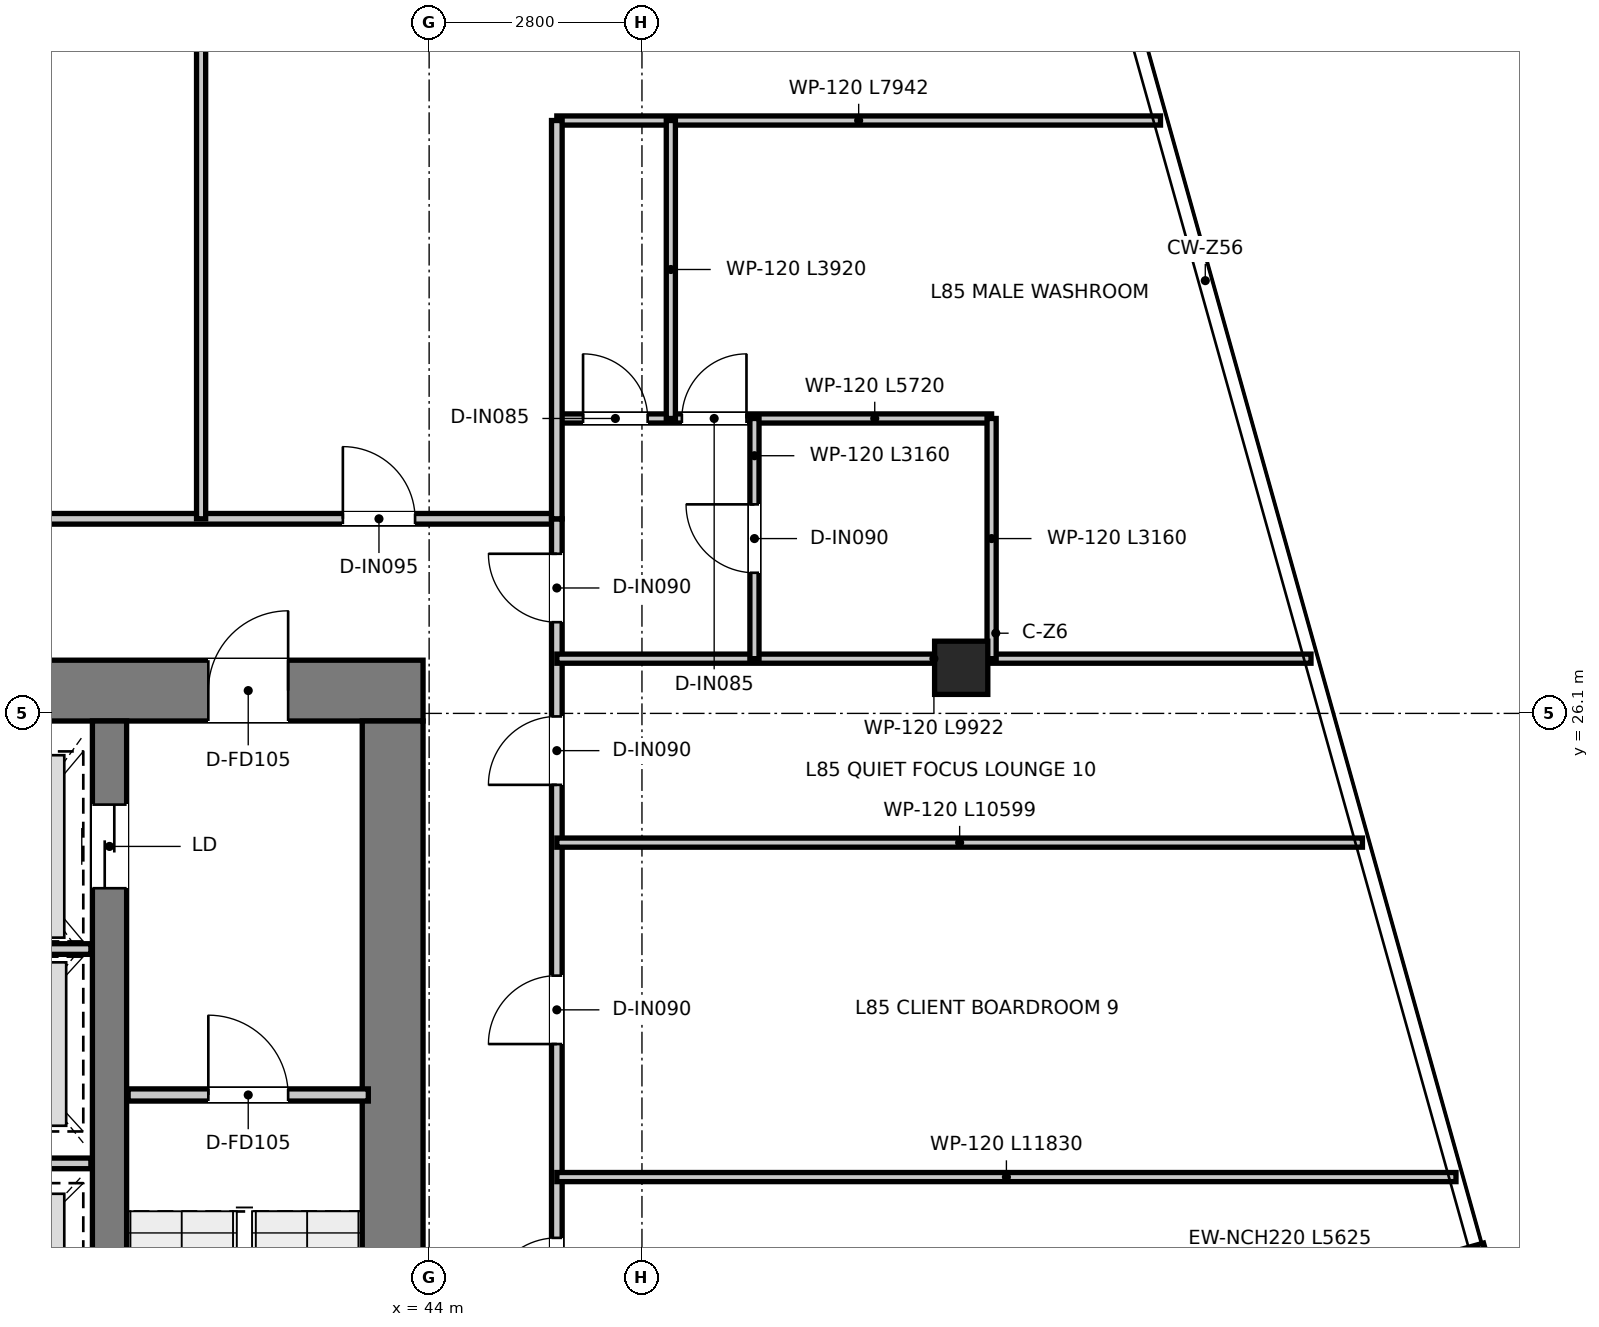
"""IFC4 building model, lengths in metres.
Left out: names, types, materials, properties, quantities, classifications, styles, units other than length and angle.
Written with IfcOpenShell. Run it as: python <this file> out.ifc"""

import sys

from ifc_helpers import new_model, si_unit, direction, frame, frame_2d, origin, origin_2d, place, context, subcontext, project, spatial, rectangle, extrude, source, transform, mapped, element, fill, save


model = new_model("IFC4")
c1 = context("Model", 3, precision=1e-05, world=origin(), true_north=direction((0.0, 1.0)))
c2 = subcontext(c1, "Body", "Model", "MODEL_VIEW")
j1 = project(units=[si_unit("LENGTHUNIT", "METRE"), si_unit("PLANEANGLEUNIT", "RADIAN")], contexts=[c1])
p1 = place(None, origin())
s1 = spatial("IfcSite", under=j1, at=p1, CompositionType="ELEMENT")
p2 = place(p1, origin())
s2 = spatial("IfcBuilding", under=s1, at=p2, CompositionType="ELEMENT")
p3 = place(p2, frame((0.0, 0.0, 347.45)))
s3 = spatial("IfcBuildingStorey", under=s2, at=p3, CompositionType="ELEMENT", Elevation=347.45)
p4 = place(p3, frame((28.08, 26.4, 0.0), z_axis=(0.0, 0.0, 1.0), x_axis=(1.0, 0.0, 0.0)))
e1 = element("IfcWall", 1, at=p4, inside=s3, PredefinedType="SHEAR", context=c2, shape_type="SweptSolid", body=[
    extrude(rectangle(XDim=15.84, YDim=0.8, at=frame_2d((7.92, 0.0))), origin(), (0.0, 0.0, 1.0), 3.95),
])
p5 = place(p4, frame((7.22, 0.0, 0.0)))
e2 = element("IfcOpeningElement", 2, at=p5, cuts=e1, PredefinedType="OPENING", context=c2, shape_type="SweptSolid", body=[
    extrude(rectangle(XDim=1.4, YDim=2.2, at=frame_2d((0.7, 1.1))), frame((0.0, 0.41, 0.0), z_axis=(0.0, -1.0, 0.0), x_axis=(1.0, 0.0, 0.0)), (0.0, 0.0, 1.0), 0.82),
])
p6 = place(p4, frame((1.775, 0.0, 0.0)))
e3 = element("IfcOpeningElement", 3, at=p6, cuts=e1, PredefinedType="OPENING", context=c2, shape_type="SweptSolid", body=[
    extrude(rectangle(XDim=1.05, YDim=2.1, at=frame_2d((0.525, 1.05))), frame((0.0, 0.41, 0.0), z_axis=(0.0, -1.0, 0.0), x_axis=(1.0, 0.0, 0.0)), (0.0, 0.0, 1.0), 0.82),
])
p7 = place(p4, frame((13.015, 0.0, 0.0)))
e4 = element("IfcOpeningElement", 4, at=p7, cuts=e1, PredefinedType="OPENING", context=c2, shape_type="SweptSolid", body=[
    extrude(rectangle(XDim=1.05, YDim=2.1, at=frame_2d((0.525, 1.05))), frame((0.0, 0.41, 0.0), z_axis=(0.0, -1.0, 0.0), x_axis=(1.0, 0.0, 0.0)), (0.0, 0.0, 1.0), 0.82),
])
p8 = place(p3, frame((43.52, 11.3, 0.0), z_axis=(0.0, 0.0, 1.0), x_axis=(0.0, 1.0, 0.0)))
e5 = element("IfcWall", 5, at=p8, inside=s3, PredefinedType="SHEAR", context=c2, shape_type="SweptSolid", body=[
    extrude(rectangle(XDim=14.7, YDim=0.8, at=frame_2d((7.35, 0.0))), origin(), (0.0, 0.0, 1.0), 3.95),
])
p9 = place(p3, frame((39.795, 13.22, 0.0), z_axis=(0.0, 0.0, 1.0), x_axis=(0.0, 1.0, 0.0)))
e6 = element("IfcWall", 6, at=p9, inside=s3, PredefinedType="SHEAR", context=c2, shape_type="SweptSolid", body=[
    extrude(rectangle(XDim=12.78, YDim=0.45, at=frame_2d((6.39, 0.0))), origin(), (0.0, 0.0, 1.0), 3.95),
])
p10 = place(p9, frame((10.58, 0.0, 0.0)))
e7 = element("IfcOpeningElement", 7, at=p10, cuts=e6, PredefinedType="OPENING", context=c2, shape_type="SweptSolid", body=[
    extrude(rectangle(XDim=1.1, YDim=2.15, at=frame_2d((0.55, 1.075))), frame((0.0, 0.235, 0.0), z_axis=(0.0, -1.0, 0.0), x_axis=(1.0, 0.0, 0.0)), (0.0, 0.0, 1.0), 0.47),
])
m1 = source(origin(), c2, "Body", "SweptSolid", [
    extrude(rectangle(XDim=0.7, YDim=0.7, at=origin_2d()), origin(), (0.0, 0.0, 1.0), 3.95),
])
p11 = place(p3, frame((51.0, 26.7, 0.0), z_axis=(0.0, 0.0, 1.0), x_axis=(1.0, 0.0, 0.0)))
e8 = element("IfcColumn", 8, at=p11, inside=s3, PredefinedType="COLUMN", context=c2, shape_type="MappedRepresentation", body=[
    mapped(m1, transform((0.0, 0.0, 0.0), x_axis=(1.0, 0.0, 0.0), y_axis=(0.0, 1.0, 0.0), z_axis=(0.0, 0.0, 1.0), scale=1.0)),
])
p12 = place(p3, frame((52.484, 17.51, 0.0), z_axis=(0.0, 0.0, 1.0), x_axis=(0.963038811961, 0.269362667524, 0.0)))
e9 = element("IfcWall", 9, at=p12, inside=s3, PredefinedType="ELEMENTEDWALL", context=c2, shape_type="SweptSolid", body=[
    extrude(rectangle(XDim=5.625, YDim=0.22, at=frame_2d((2.812, 0.0))), origin(), (0.0, 0.0, 1.0), 3.67),
])
p13 = place(p3, frame((40.04, 21.08, 0.0), z_axis=(0.0, 0.0, 1.0), x_axis=(1.0, 0.0, 0.0)))
e10 = element("IfcWall", 10, at=p13, inside=s3, PredefinedType="PARTITIONING", context=c2, shape_type="SweptSolid", body=[
    extrude(rectangle(XDim=3.16, YDim=0.16, at=frame_2d((1.58, 0.0))), origin(), (0.0, 0.0, 1.0), 3.67),
])
p14 = place(p13, frame((1.055, 0.0, 0.0)))
e11 = element("IfcOpeningElement", 11, at=p14, cuts=e10, PredefinedType="OPENING", context=c2, shape_type="SweptSolid", body=[
    extrude(rectangle(XDim=1.05, YDim=2.1, at=frame_2d((0.525, 1.05))), frame((0.0, 0.09, 0.0), z_axis=(0.0, -1.0, 0.0), x_axis=(1.0, 0.0, 0.0)), (0.0, 0.0, 1.0), 0.18),
])
p15 = place(p3, frame((37.28, 23.0, 0.0), z_axis=(0.0, 0.0, 1.0), x_axis=(1.0, 0.0, 0.0)))
e12 = element("IfcWall", 12, at=p15, inside=s3, PredefinedType="PARTITIONING", context=c2, shape_type="SweptSolid", body=[
    extrude(rectangle(XDim=2.27, YDim=0.14, at=frame_2d((1.135, 0.0))), origin(), (0.0, 0.0, 1.0), 2.82),
])
p16 = place(p3, frame((37.28, 20.18, 0.0), z_axis=(0.0, 0.0, 1.0), x_axis=(1.0, 0.0, 0.0)))
e13 = element("IfcWall", 13, at=p16, inside=s3, PredefinedType="PARTITIONING", context=c2, shape_type="SweptSolid", body=[
    extrude(rectangle(XDim=2.27, YDim=0.14, at=frame_2d((1.135, 0.0))), origin(), (0.0, 0.0, 1.0), 3.67),
])
p17 = place(p3, frame((26.32, 28.66, 0.0), z_axis=(0.0, 0.0, 1.0), x_axis=(1.0, 0.0, 0.0)))
e14 = element("IfcWall", 14, at=p17, inside=s3, PredefinedType="PARTITIONING", context=c2, shape_type="SweptSolid", body=[
    extrude(rectangle(XDim=19.36, YDim=0.14, at=frame_2d((9.68, 0.0))), origin(), (0.0, 0.0, 1.0), 3.18),
])
p18 = place(p17, frame((1.115, 0.0, 0.0)))
e15 = element("IfcOpeningElement", 15, at=p18, cuts=e14, PredefinedType="OPENING", context=c2, shape_type="SweptSolid", body=[
    extrude(rectangle(XDim=0.95, YDim=2.1, at=frame_2d((0.475, 1.05))), frame((0.0, 0.08, 0.0), z_axis=(0.0, -1.0, 0.0), x_axis=(1.0, 0.0, 0.0)), (0.0, 0.0, 1.0), 0.16),
])
p19 = place(p17, frame((5.455, 0.0, 0.0)))
e16 = element("IfcOpeningElement", 16, at=p19, cuts=e14, PredefinedType="OPENING", context=c2, shape_type="SweptSolid", body=[
    extrude(rectangle(XDim=0.95, YDim=2.1, at=frame_2d((0.475, 1.05))), frame((0.0, 0.08, 0.0), z_axis=(0.0, -1.0, 0.0), x_axis=(1.0, 0.0, 0.0)), (0.0, 0.0, 1.0), 0.16),
])
p20 = place(p17, frame((11.205, 0.0, 0.0)))
e17 = element("IfcOpeningElement", 17, at=p20, cuts=e14, PredefinedType="OPENING", context=c2, shape_type="SweptSolid", body=[
    extrude(rectangle(XDim=0.95, YDim=2.1, at=frame_2d((0.475, 1.05))), frame((0.0, 0.08, 0.0), z_axis=(0.0, -1.0, 0.0), x_axis=(1.0, 0.0, 0.0)), (0.0, 0.0, 1.0), 0.16),
])
p21 = place(p17, frame((16.545, 0.0, 0.0)))
e18 = element("IfcOpeningElement", 18, at=p21, cuts=e14, PredefinedType="OPENING", context=c2, shape_type="SweptSolid", body=[
    extrude(rectangle(XDim=0.95, YDim=2.1, at=frame_2d((0.475, 1.05))), frame((0.0, 0.08, 0.0), z_axis=(0.0, -1.0, 0.0), x_axis=(1.0, 0.0, 0.0)), (0.0, 0.0, 1.0), 0.16),
])
p22 = place(p3, frame((45.68, 13.0, 0.0), z_axis=(0.0, 0.0, 1.0), x_axis=(0.0, 1.0, 0.0)))
e19 = element("IfcWall", 19, at=p22, inside=s3, PredefinedType="PARTITIONING", context=c2, shape_type="SweptSolid", body=[
    extrude(rectangle(XDim=15.66, YDim=0.14, at=frame_2d((7.83, 0.0))), origin(), (0.0, 0.0, 1.0), 3.13),
])
p23 = place(p22, frame((14.3, 0.0, 0.0)))
e20 = element("IfcOpeningElement", 20, at=p23, cuts=e19, PredefinedType="OPENING", context=c2, shape_type="SweptSolid", body=[
    extrude(rectangle(XDim=0.9, YDim=2.1, at=frame_2d((0.45, 1.05))), frame((0.0, 0.08, 0.0), z_axis=(0.0, -1.0, 0.0), x_axis=(1.0, 0.0, 0.0)), (0.0, 0.0, 1.0), 0.16),
])
p24 = place(p22, frame((5.3, 0.0, 0.0)))
e21 = element("IfcOpeningElement", 21, at=p24, cuts=e19, PredefinedType="OPENING", context=c2, shape_type="SweptSolid", body=[
    extrude(rectangle(XDim=0.9, YDim=2.1, at=frame_2d((0.45, 1.05))), frame((0.0, 0.08, 0.0), z_axis=(0.0, -1.0, 0.0), x_axis=(1.0, 0.0, 0.0)), (0.0, 0.0, 1.0), 0.16),
])
p25 = place(p22, frame((8.75, 0.0, 0.0)))
e22 = element("IfcOpeningElement", 22, at=p25, cuts=e19, PredefinedType="OPENING", context=c2, shape_type="SweptSolid", body=[
    extrude(rectangle(XDim=0.9, YDim=2.1, at=frame_2d((0.45, 1.05))), frame((0.0, 0.08, 0.0), z_axis=(0.0, -1.0, 0.0), x_axis=(1.0, 0.0, 0.0)), (0.0, 0.0, 1.0), 0.16),
])
p26 = place(p22, frame((12.16, 0.0, 0.0)))
e23 = element("IfcOpeningElement", 23, at=p26, cuts=e19, PredefinedType="OPENING", context=c2, shape_type="SweptSolid", body=[
    extrude(rectangle(XDim=0.9, YDim=2.1, at=frame_2d((0.45, 1.05))), frame((0.0, 0.08, 0.0), z_axis=(0.0, -1.0, 0.0), x_axis=(1.0, 0.0, 0.0)), (0.0, 0.0, 1.0), 0.16),
])
p27 = place(p3, frame((45.68, 26.82, 0.0), z_axis=(0.0, 0.0, 1.0), x_axis=(1.0, 0.0, 0.0)))
e24 = element("IfcWall", 24, at=p27, inside=s3, PredefinedType="PARTITIONING", context=c2, shape_type="SweptSolid", body=[
    extrude(rectangle(XDim=9.922, YDim=0.12, at=frame_2d((4.961, 0.0))), origin(), (0.0, 0.0, 1.0), 3.13),
])
p28 = place(p3, frame((45.68, 33.9, 0.0), z_axis=(0.0, 0.0, 1.0), x_axis=(1.0, 0.0, 0.0)))
e25 = element("IfcWall", 25, at=p28, inside=s3, PredefinedType="PARTITIONING", context=c2, shape_type="SweptSolid", body=[
    extrude(rectangle(XDim=7.942, YDim=0.12, at=frame_2d((3.971, 0.0))), origin(), (0.0, 0.0, 1.0), 3.13),
])
p29 = place(p3, frame((45.68, 29.98, 0.0), z_axis=(0.0, 0.0, 1.0), x_axis=(1.0, 0.0, 0.0)))
e26 = element("IfcWall", 26, at=p29, inside=s3, PredefinedType="PARTITIONING", context=c2, shape_type="SweptSolid", body=[
    extrude(rectangle(XDim=5.72, YDim=0.12, at=frame_2d((2.86, 0.0))), origin(), (0.0, 0.0, 1.0), 3.13),
])
p30 = place(p29, frame((1.645, 0.0, 0.0)))
e27 = element("IfcOpeningElement", 27, at=p30, cuts=e26, PredefinedType="OPENING", context=c2, shape_type="SweptSolid", body=[
    extrude(rectangle(XDim=0.85, YDim=2.1, at=frame_2d((0.425, 1.05))), frame((0.0, 0.07, 0.0), z_axis=(0.0, -1.0, 0.0), x_axis=(1.0, 0.0, 0.0)), (0.0, 0.0, 1.0), 0.14),
])
p31 = place(p29, frame((0.345, 0.0, 0.0)))
e28 = element("IfcOpeningElement", 28, at=p31, cuts=e26, PredefinedType="OPENING", context=c2, shape_type="SweptSolid", body=[
    extrude(rectangle(XDim=0.85, YDim=2.1, at=frame_2d((0.425, 1.05))), frame((0.0, 0.07, 0.0), z_axis=(0.0, -1.0, 0.0), x_axis=(1.0, 0.0, 0.0)), (0.0, 0.0, 1.0), 0.14),
])
p32 = place(p3, frame((51.4, 26.82, 0.0), z_axis=(0.0, 0.0, 1.0), x_axis=(0.0, 1.0, 0.0)))
e29 = element("IfcWall", 29, at=p32, inside=s3, PredefinedType="PARTITIONING", context=c2, shape_type="SweptSolid", body=[
    extrude(rectangle(XDim=3.16, YDim=0.12, at=frame_2d((1.58, 0.0))), origin(), (0.0, 0.0, 1.0), 3.67),
])
p33 = place(p3, frame((48.28, 26.82, 0.0), z_axis=(0.0, 0.0, 1.0), x_axis=(0.0, 1.0, 0.0)))
e30 = element("IfcWall", 30, at=p33, inside=s3, PredefinedType="PARTITIONING", context=c2, shape_type="SweptSolid", body=[
    extrude(rectangle(XDim=3.16, YDim=0.12, at=frame_2d((1.58, 0.0))), origin(), (0.0, 0.0, 1.0), 3.18),
])
p34 = place(p33, frame((1.13, 0.0, 0.0)))
e31 = element("IfcOpeningElement", 31, at=p34, cuts=e30, PredefinedType="OPENING", context=c2, shape_type="SweptSolid", body=[
    extrude(rectangle(XDim=0.9, YDim=2.1, at=frame_2d((0.45, 1.05))), frame((0.0, 0.07, 0.0), z_axis=(0.0, -1.0, 0.0), x_axis=(1.0, 0.0, 0.0)), (0.0, 0.0, 1.0), 0.14),
])
p35 = place(p3, frame((47.18, 29.98, 0.0), z_axis=(0.0, 0.0, 1.0), x_axis=(0.0, 1.0, 0.0)))
e32 = element("IfcWall", 32, at=p35, inside=s3, PredefinedType="PARTITIONING", context=c2, shape_type="SweptSolid", body=[
    extrude(rectangle(XDim=3.92, YDim=0.12, at=frame_2d((1.96, 0.0))), origin(), (0.0, 0.0, 1.0), 3.37),
])
p36 = place(p3, frame((45.68, 28.66, 0.0), z_axis=(0.0, 0.0, 1.0), x_axis=(0.0, 1.0, 0.0)))
e33 = element("IfcWall", 33, at=p36, inside=s3, PredefinedType="PARTITIONING", context=c2, shape_type="SweptSolid", body=[
    extrude(rectangle(XDim=5.24, YDim=0.14, at=frame_2d((2.62, 0.0))), origin(), (0.0, 0.0, 1.0), 3.43),
])
p37 = place(p3, frame((41.0, 28.66, 0.0), z_axis=(0.0, 0.0, 1.0), x_axis=(0.0, 1.0, 0.0)))
e34 = element("IfcWall", 34, at=p37, inside=s3, PredefinedType="PARTITIONING", context=c2, shape_type="SweptSolid", body=[
    extrude(rectangle(XDim=19.074, YDim=0.12, at=frame_2d((9.537, 0.0))), origin(), (0.0, 0.0, 1.0), 3.13),
])
p38 = place(p3, frame((45.68, 20.0, 0.0), z_axis=(0.0, 0.0, 1.0), x_axis=(1.0, 0.0, 0.0)))
e35 = element("IfcWall", 35, at=p38, inside=s3, PredefinedType="PARTITIONING", context=c2, shape_type="SweptSolid", body=[
    extrude(rectangle(XDim=11.83, YDim=0.12, at=frame_2d((5.915, 0.0))), origin(), (0.0, 0.0, 1.0), 3.13),
])
p39 = place(p3, frame((45.68, 24.4, 0.0), z_axis=(0.0, 0.0, 1.0), x_axis=(1.0, 0.0, 0.0)))
e36 = element("IfcWall", 36, at=p39, inside=s3, PredefinedType="PARTITIONING", context=c2, shape_type="SweptSolid", body=[
    extrude(rectangle(XDim=10.599, YDim=0.12, at=frame_2d((5.299, 0.0))), origin(), (0.0, 0.0, 1.0), 3.13),
])
p40 = place(p14, origin())
e37 = element("IfcDoor", 37, at=p40, inside=s3, OperationType="SINGLE_SWING_LEFT", PredefinedType="DOOR", context=c2, shape_type="SweptSolid", body=[
    extrude(rectangle(XDim=1.05, YDim=2.1, at=frame_2d((0.525, 1.05))), frame((0.0, 0.025, 0.0), z_axis=(0.0, -1.0, 0.0), x_axis=(1.0, 0.0, 0.0)), (0.0, 0.0, 1.0), 0.05),
])
fill(e11, e37)
p41 = place(p7, origin())
e38 = element("IfcDoor", 38, at=p41, inside=s3, OperationType="SINGLE_SWING_RIGHT", PredefinedType="DOOR", context=c2, shape_type="SweptSolid", body=[
    extrude(rectangle(XDim=1.05, YDim=2.1, at=frame_2d((0.525, 1.05))), frame((0.0, 0.025, 0.0), z_axis=(0.0, -1.0, 0.0), x_axis=(1.0, 0.0, 0.0)), (0.0, 0.0, 1.0), 0.05),
])
fill(e4, e38)
p42 = place(p10, origin())
e39 = element("IfcDoor", 39, at=p42, inside=s3, OperationType="DOUBLE_DOOR_SLIDING", PredefinedType="DOOR", context=c2, shape_type="SweptSolid", body=[
    extrude(rectangle(XDim=1.1, YDim=2.15, at=frame_2d((0.55, 1.075))), frame((0.0, 0.025, 0.0), z_axis=(0.0, -1.0, 0.0), x_axis=(1.0, 0.0, 0.0)), (0.0, 0.0, 1.0), 0.05),
])
fill(e7, e39)
p43 = place(p23, origin())
e40 = element("IfcDoor", 40, at=p43, inside=s3, OperationType="SINGLE_SWING_RIGHT", PredefinedType="DOOR", context=c2, shape_type="SweptSolid", body=[
    extrude(rectangle(XDim=0.9, YDim=2.1, at=frame_2d((0.45, 1.05))), frame((0.0, 0.025, 0.0), z_axis=(0.0, -1.0, 0.0), x_axis=(1.0, 0.0, 0.0)), (0.0, 0.0, 1.0), 0.05),
])
fill(e20, e40)
p44 = place(p30, origin())
e41 = element("IfcDoor", 41, at=p44, inside=s3, OperationType="SINGLE_SWING_RIGHT", PredefinedType="DOOR", context=c2, shape_type="SweptSolid", body=[
    extrude(rectangle(XDim=0.85, YDim=2.1, at=frame_2d((0.425, 1.05))), frame((0.0, 0.025, 0.0), z_axis=(0.0, -1.0, 0.0), x_axis=(1.0, 0.0, 0.0)), (0.0, 0.0, 1.0), 0.05),
])
fill(e27, e41)
p45 = place(p31, origin())
e42 = element("IfcDoor", 42, at=p45, inside=s3, OperationType="SINGLE_SWING_LEFT", PredefinedType="DOOR", context=c2, shape_type="SweptSolid", body=[
    extrude(rectangle(XDim=0.85, YDim=2.1, at=frame_2d((0.425, 1.05))), frame((0.0, 0.025, 0.0), z_axis=(0.0, -1.0, 0.0), x_axis=(1.0, 0.0, 0.0)), (0.0, 0.0, 1.0), 0.05),
])
fill(e28, e42)
p46 = place(p34, origin())
e43 = element("IfcDoor", 43, at=p46, inside=s3, OperationType="SINGLE_SWING_RIGHT", PredefinedType="DOOR", context=c2, shape_type="SweptSolid", body=[
    extrude(rectangle(XDim=0.9, YDim=2.1, at=frame_2d((0.45, 1.05))), frame((0.0, 0.025, 0.0), z_axis=(0.0, -1.0, 0.0), x_axis=(1.0, 0.0, 0.0)), (0.0, 0.0, 1.0), 0.05),
])
fill(e31, e43)
p47 = place(p21, origin())
e44 = element("IfcDoor", 44, at=p47, inside=s3, OperationType="SINGLE_SWING_LEFT", PredefinedType="DOOR", context=c2, shape_type="SweptSolid", body=[
    extrude(rectangle(XDim=0.95, YDim=2.1, at=frame_2d((0.475, 1.05))), frame((0.0, 0.025, 0.0), z_axis=(0.0, -1.0, 0.0), x_axis=(1.0, 0.0, 0.0)), (0.0, 0.0, 1.0), 0.05),
])
fill(e18, e44)
p48 = place(p24, origin())
e45 = element("IfcDoor", 45, at=p48, inside=s3, OperationType="SINGLE_SWING_LEFT", PredefinedType="DOOR", context=c2, shape_type="SweptSolid", body=[
    extrude(rectangle(XDim=0.9, YDim=2.1, at=frame_2d((0.45, 1.05))), frame((0.0, 0.025, 0.0), z_axis=(0.0, -1.0, 0.0), x_axis=(1.0, 0.0, 0.0)), (0.0, 0.0, 1.0), 0.05),
])
fill(e21, e45)
p49 = place(p25, origin())
e46 = element("IfcDoor", 46, at=p49, inside=s3, OperationType="SINGLE_SWING_LEFT", PredefinedType="DOOR", context=c2, shape_type="SweptSolid", body=[
    extrude(rectangle(XDim=0.9, YDim=2.1, at=frame_2d((0.45, 1.05))), frame((0.0, 0.025, 0.0), z_axis=(0.0, -1.0, 0.0), x_axis=(1.0, 0.0, 0.0)), (0.0, 0.0, 1.0), 0.05),
])
fill(e22, e46)
p50 = place(p26, origin())
e47 = element("IfcDoor", 47, at=p50, inside=s3, OperationType="SINGLE_SWING_LEFT", PredefinedType="DOOR", context=c2, shape_type="SweptSolid", body=[
    extrude(rectangle(XDim=0.9, YDim=2.1, at=frame_2d((0.45, 1.05))), frame((0.0, 0.025, 0.0), z_axis=(0.0, -1.0, 0.0), x_axis=(1.0, 0.0, 0.0)), (0.0, 0.0, 1.0), 0.05),
])
fill(e23, e47)
save(model, sys.argv[1])
